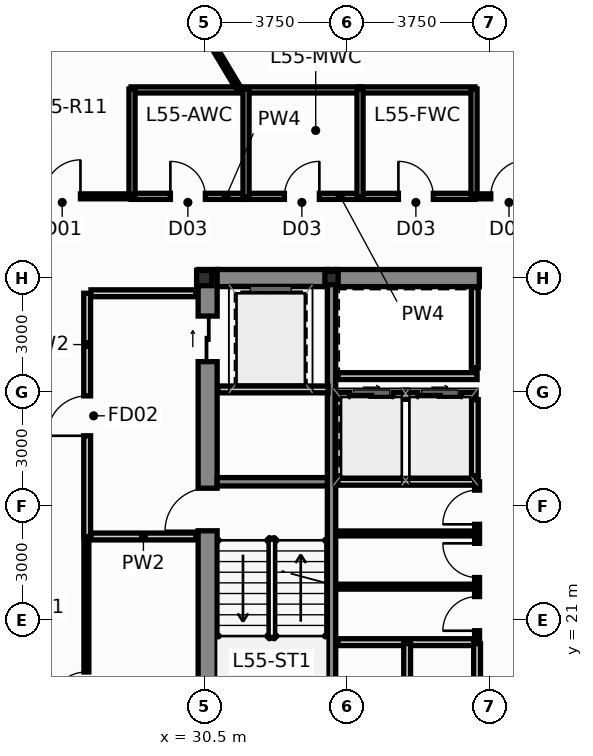
"""IFC4 building model, lengths in metres.
Left out: names, types, materials, properties, quantities, classifications, styles, units other than length and angle.
Written with IfcOpenShell. Run it as: python <this file> out.ifc"""

import sys

from ifc_helpers import new_model, si_unit, direction, frame, frame_2d, origin, origin_2d, place, context, subcontext, project, spatial, rectangle, hollow_rectangle, i_section, extrude, source, transform, mapped, element, fill, save


model = new_model("IFC4")
c1 = context("Model", 3, precision=1e-05, world=origin(), true_north=direction((0.0, 1.0)))
c2 = subcontext(c1, "Body", "Model", "MODEL_VIEW")
j1 = project(units=[si_unit("LENGTHUNIT", "METRE"), si_unit("PLANEANGLEUNIT", "RADIAN")], contexts=[c1])
p1 = place(None, origin())
s1 = spatial("IfcSite", under=j1, at=p1, CompositionType="ELEMENT")
p2 = place(p1, origin())
s2 = spatial("IfcBuilding", under=s1, at=p2, CompositionType="ELEMENT")
p3 = place(p2, frame((0.0, 0.0, 209.6)))
s3 = spatial("IfcBuildingStorey", under=s2, at=p3, CompositionType="ELEMENT", Elevation=209.6)
m1 = source(origin(), c2, "Body", "SweptSolid", [
    extrude(i_section(OverallWidth=0.4, OverallDepth=0.4, WebThickness=0.02, FlangeThickness=0.032, at=origin_2d()), origin(), (0.0, 0.0, 1.0), 3.65),
])
p4 = place(p3, frame((30.5, 30.0, 0.0), z_axis=(0.0, 0.0, 1.0), x_axis=(1.0, 0.0, 0.0)))
e1 = element("IfcColumn", 1, at=p4, inside=s3, PredefinedType="COLUMN", context=c2, shape_type="MappedRepresentation", body=[
    mapped(m1, transform((0.0, 0.0, 0.0), scale=1.0)),
])
m2 = source(origin(), c2, "Body", "SweptSolid", [
    extrude(hollow_rectangle(XDim=0.35, YDim=0.35, WallThickness=0.016, at=origin_2d()), origin(), (0.0, 0.0, 1.0), 3.65),
])
p5 = place(p3, frame((33.85, 30.0, 0.0), z_axis=(0.0, 0.0, 1.0), x_axis=(1.0, 0.0, 0.0)))
e2 = element("IfcColumn", 2, at=p5, inside=s3, PredefinedType="COLUMN", context=c2, shape_type="MappedRepresentation", body=[
    mapped(m2, transform((0.0, 0.0, 0.0), scale=1.0)),
])
p6 = place(p3, frame((30.59, 16.95, 0.0), z_axis=(0.0, 0.0, 1.0), x_axis=(0.0, 1.0, 0.0)))
e3 = element("IfcWall", 3, at=p6, inside=s3, PredefinedType="SHEAR", context=c2, shape_type="SweptSolid", body=[
    extrude(rectangle(XDim=13.275, YDim=0.5, at=frame_2d((6.638, 0.0))), origin(), (0.0, 0.0, 1.0), 3.65),
])
p7 = place(p6, frame((6.4, 0.0, 0.0)))
e4 = element("IfcOpeningElement", 4, at=p7, cuts=e3, PredefinedType="OPENING", context=c2, shape_type="SweptSolid", body=[
    extrude(rectangle(XDim=1.12, YDim=2.15, at=frame_2d((0.56, 1.075))), frame((0.0, 0.262, 0.0), z_axis=(0.0, -1.0, 0.0), x_axis=(1.0, 0.0, 0.0)), (0.0, 0.0, 1.0), 0.524),
])
p8 = place(p6, frame((10.85, 0.0, 0.0)))
e5 = element("IfcOpeningElement", 5, at=p8, cuts=e3, PredefinedType="OPENING", context=c2, shape_type="SweptSolid", body=[
    extrude(rectangle(XDim=1.2, YDim=2.2, at=frame_2d((0.6, 1.1))), frame((0.0, 0.262, 0.0), z_axis=(0.0, -1.0, 0.0), x_axis=(1.0, 0.0, 0.0)), (0.0, 0.0, 1.0), 0.524),
])
p9 = place(p3, frame((30.84, 30.0, 0.0), z_axis=(0.0, 0.0, 1.0), x_axis=(1.0, 0.0, 0.0)))
e6 = element("IfcWall", 6, at=p9, inside=s3, PredefinedType="SHEAR", context=c2, shape_type="SweptSolid", body=[
    extrude(rectangle(XDim=2.9, YDim=0.45, at=frame_2d((1.45, 0.0))), origin(), (0.0, 0.0, 1.0), 3.65),
])
p10 = place(p3, frame((33.96, 30.0, 0.0), z_axis=(0.0, 0.0, 1.0), x_axis=(1.0, 0.0, 0.0)))
e7 = element("IfcWall", 7, at=p10, inside=s3, PredefinedType="SHEAR", context=c2, shape_type="SweptSolid", body=[
    extrude(rectangle(XDim=3.78, YDim=0.45, at=frame_2d((1.89, 0.0))), origin(), (0.0, 0.0, 1.0), 3.65),
])
p11 = place(p3, frame((33.85, 16.95, 0.0), z_axis=(0.0, 0.0, 1.0), x_axis=(0.0, 1.0, 0.0)))
e8 = element("IfcWall", 8, at=p11, inside=s3, PredefinedType="SHEAR", context=c2, shape_type="SweptSolid", body=[
    extrude(rectangle(XDim=13.275, YDim=0.22, at=frame_2d((6.638, 0.0))), origin(), (0.0, 0.0, 1.0), 3.65),
])
p12 = place(p3, frame((30.84, 24.64, 0.0), z_axis=(0.0, 0.0, 1.0), x_axis=(1.0, 0.0, 0.0)))
e9 = element("IfcWall", 9, at=p12, inside=s3, PredefinedType="SHEAR", context=c2, shape_type="SweptSolid", body=[
    extrude(rectangle(XDim=2.9, YDim=0.22, at=frame_2d((1.45, 0.0))), origin(), (0.0, 0.0, 1.0), 3.65),
])
p13 = place(p3, frame((34.02, 26.9, 0.0), z_axis=(0.0, 0.0, 1.0), x_axis=(1.0, 0.0, 0.0)))
e10 = element("IfcWall", 10, at=p13, inside=s3, PredefinedType="PARTITIONING", context=c2, shape_type="SweptSolid", body=[
    extrude(rectangle(XDim=3.6, YDim=0.18, at=frame_2d((1.8, 0.0))), origin(), (0.0, 0.0, 1.0), 3.4),
])
p14 = place(p13, frame((0.3, 0.0, 0.0)))
e11 = element("IfcOpeningElement", 11, at=p14, cuts=e10, PredefinedType="OPENING", context=c2, shape_type="SweptSolid", body=[
    extrude(rectangle(XDim=1.15, YDim=2.2, at=frame_2d((0.575, 1.1))), frame((0.0, 0.102, 0.0), z_axis=(0.0, -1.0, 0.0), x_axis=(1.0, 0.0, 0.0)), (0.0, 0.0, 1.0), 0.204),
])
p15 = place(p13, frame((2.1, 0.0, 0.0)))
e12 = element("IfcOpeningElement", 12, at=p15, cuts=e10, PredefinedType="OPENING", context=c2, shape_type="SweptSolid", body=[
    extrude(rectangle(XDim=1.15, YDim=2.2, at=frame_2d((0.575, 1.1))), frame((0.0, 0.102, 0.0), z_axis=(0.0, -1.0, 0.0), x_axis=(1.0, 0.0, 0.0)), (0.0, 0.0, 1.0), 0.204),
])
p16 = place(p3, frame((37.62, 24.8, 0.0), z_axis=(0.0, 0.0, 1.0), x_axis=(0.0, 1.0, 0.0)))
e13 = element("IfcWall", 13, at=p16, inside=s3, PredefinedType="PARTITIONING", context=c2, shape_type="SweptSolid", body=[
    extrude(rectangle(XDim=2.0, YDim=0.18, at=frame_2d((1.0, 0.0))), origin(), (0.0, 0.0, 1.0), 3.4),
])
p17 = place(p3, frame((34.02, 24.64, 0.0), z_axis=(0.0, 0.0, 1.0), x_axis=(1.0, 0.0, 0.0)))
e14 = element("IfcWall", 14, at=p17, inside=s3, PredefinedType="PARTITIONING", context=c2, shape_type="SweptSolid", body=[
    extrude(rectangle(XDim=3.68, YDim=0.18, at=frame_2d((1.84, 0.0))), origin(), (0.0, 0.0, 1.0), 3.4),
])
p18 = place(p3, frame((34.02, 27.42, 0.0), z_axis=(0.0, 0.0, 1.0), x_axis=(1.0, 0.0, 0.0)))
e15 = element("IfcWall", 15, at=p18, inside=s3, PredefinedType="PARTITIONING", context=c2, shape_type="SweptSolid", body=[
    extrude(rectangle(XDim=3.66, YDim=0.18, at=frame_2d((1.83, 0.0))), origin(), (0.0, 0.0, 1.0), 3.4),
])
p19 = place(p3, frame((37.62, 27.64, 0.0), z_axis=(0.0, 0.0, 1.0), x_axis=(0.0, 1.0, 0.0)))
e16 = element("IfcWall", 16, at=p19, inside=s3, PredefinedType="PARTITIONING", context=c2, shape_type="SweptSolid", body=[
    extrude(rectangle(XDim=2.11, YDim=0.18, at=frame_2d((1.055, 0.0))), origin(), (0.0, 0.0, 1.0), 3.4),
])
p20 = place(p3, frame((27.42, 23.2, 0.0), z_axis=(0.0, 0.0, 1.0), x_axis=(0.0, 1.0, 0.0)))
e17 = element("IfcWall", 17, at=p20, inside=s3, PredefinedType="PARTITIONING", context=c2, shape_type="SweptSolid", body=[
    extrude(rectangle(XDim=6.4, YDim=0.18, at=frame_2d((3.2, 0.0))), origin(), (0.0, 0.0, 1.0), 3.078),
])
p21 = place(p20, frame((2.65, 0.0, 0.0)))
e18 = element("IfcOpeningElement", 18, at=p21, cuts=e17, PredefinedType="OPENING", context=c2, shape_type="SweptSolid", body=[
    extrude(rectangle(XDim=1.05, YDim=2.15, at=frame_2d((0.525, 1.075))), frame((0.0, 0.102, 0.0), z_axis=(0.0, -1.0, 0.0), x_axis=(1.0, 0.0, 0.0)), (0.0, 0.0, 1.0), 0.204),
])
p22 = place(p3, frame((27.52, 23.2, 0.0), z_axis=(0.0, 0.0, 1.0), x_axis=(1.0, 0.0, 0.0)))
e19 = element("IfcWall", 19, at=p22, inside=s3, PredefinedType="PARTITIONING", context=c2, shape_type="SweptSolid", body=[
    extrude(rectangle(XDim=2.76, YDim=0.18, at=frame_2d((1.38, 0.0))), origin(), (0.0, 0.0, 1.0), 3.4),
])
p23 = place(p3, frame((27.52, 29.6, 0.0), z_axis=(0.0, 0.0, 1.0), x_axis=(1.0, 0.0, 0.0)))
e20 = element("IfcWall", 20, at=p23, inside=s3, PredefinedType="PARTITIONING", context=c2, shape_type="SweptSolid", body=[
    extrude(rectangle(XDim=2.76, YDim=0.18, at=frame_2d((1.38, 0.0))), origin(), (0.0, 0.0, 1.0), 2.925),
])
p24 = place(p3, frame((30.86, 27.07, 0.0), z_axis=(0.0, 0.0, 1.0), x_axis=(1.0, 0.0, 0.0)))
e21 = element("IfcWall", 21, at=p24, inside=s3, PredefinedType="PARTITIONING", context=c2, shape_type="SweptSolid", body=[
    extrude(rectangle(XDim=2.9, YDim=0.18, at=frame_2d((1.45, 0.0))), origin(), (0.0, 0.0, 1.0), 3.4),
])
p25 = place(p3, frame((34.02, 20.42, 0.0), z_axis=(0.0, 0.0, 1.0), x_axis=(1.0, 0.0, 0.0)))
e22 = element("IfcWall", 22, at=p25, inside=s3, PredefinedType="PARTITIONING", context=c2, shape_type="SweptSolid", body=[
    extrude(rectangle(XDim=3.64, YDim=0.18, at=frame_2d((1.82, 0.0))), origin(), (0.0, 0.0, 1.0), 3.4),
])
for number, where, z_axis, x_axis in (
    (23, (34.02, 21.88, 0.0), (0.0, 0.0, 1.0), (1.0, 0.0, 0.0)),
    (24, (34.02, 23.28, 0.0), (0.0, 0.0, 1.0), (1.0, 0.0, 0.0)),
):
    element("IfcWall", number, at=place(p3, frame(where, z_axis=z_axis, x_axis=x_axis)), inside=s3, PredefinedType="PARTITIONING", context=c2, shape_type="SweptSolid", body=[
        extrude(rectangle(XDim=3.58, YDim=0.13, at=frame_2d((1.79, 0.0))), origin(), (0.0, 0.0, 1.0), 3.4),
    ])
p26 = place(p3, frame((37.68, 20.5, 0.0), z_axis=(0.0, 0.0, 1.0), x_axis=(0.0, 1.0, 0.0)))
e25 = element("IfcWall", 25, at=p26, inside=s3, PredefinedType="PARTITIONING", context=c2, shape_type="SweptSolid", body=[
    extrude(rectangle(XDim=4.14, YDim=0.13, at=frame_2d((2.07, 0.0))), origin(), (0.0, 0.0, 1.0), 3.4),
])
p27 = place(p26, frame((0.22, 0.0, 0.0)))
e26 = element("IfcOpeningElement", 26, at=p27, cuts=e25, PredefinedType="OPENING", context=c2, shape_type="SweptSolid", body=[
    extrude(rectangle(XDim=0.9, YDim=2.1, at=frame_2d((0.45, 1.05))), frame((0.0, 0.077, 0.0), z_axis=(0.0, -1.0, 0.0), x_axis=(1.0, 0.0, 0.0)), (0.0, 0.0, 1.0), 0.154),
])
p28 = place(p26, frame((1.62, 0.0, 0.0)))
e27 = element("IfcOpeningElement", 27, at=p28, cuts=e25, PredefinedType="OPENING", context=c2, shape_type="SweptSolid", body=[
    extrude(rectangle(XDim=0.9, YDim=2.1, at=frame_2d((0.45, 1.05))), frame((0.0, 0.077, 0.0), z_axis=(0.0, -1.0, 0.0), x_axis=(1.0, 0.0, 0.0)), (0.0, 0.0, 1.0), 0.154),
])
p29 = place(p26, frame((3.02, 0.0, 0.0)))
e28 = element("IfcOpeningElement", 28, at=p29, cuts=e25, PredefinedType="OPENING", context=c2, shape_type="SweptSolid", body=[
    extrude(rectangle(XDim=0.9, YDim=2.1, at=frame_2d((0.45, 1.05))), frame((0.0, 0.077, 0.0), z_axis=(0.0, -1.0, 0.0), x_axis=(1.0, 0.0, 0.0)), (0.0, 0.0, 1.0), 0.154),
])
p30 = place(p3, frame((35.84, 17.68, 0.0), z_axis=(0.0, 0.0, 1.0), x_axis=(0.0, 1.0, 0.0)))
e29 = element("IfcWall", 29, at=p30, inside=s3, PredefinedType="PARTITIONING", context=c2, shape_type="SweptSolid", body=[
    extrude(rectangle(XDim=2.7, YDim=0.18, at=frame_2d((1.35, 0.0))), origin(), (0.0, 0.0, 1.0), 3.4),
])
p31 = place(p30, frame((0.85, 0.0, 0.0)))
e30 = element("IfcOpeningElement", 30, at=p31, cuts=e29, PredefinedType="OPENING", context=c2, shape_type="SweptSolid", body=[
    extrude(rectangle(XDim=0.9, YDim=2.1, at=frame_2d((0.45, 1.05))), frame((0.0, 0.102, 0.0), z_axis=(0.0, -1.0, 0.0), x_axis=(1.0, 0.0, 0.0)), (0.0, 0.0, 1.0), 0.204),
])
p32 = place(p3, frame((37.68, 17.68, 0.0), z_axis=(0.0, 0.0, 1.0), x_axis=(0.0, 1.0, 0.0)))
e31 = element("IfcWall", 31, at=p32, inside=s3, PredefinedType="PARTITIONING", context=c2, shape_type="SweptSolid", body=[
    extrude(rectangle(XDim=2.7, YDim=0.18, at=frame_2d((1.35, 0.0))), origin(), (0.0, 0.0, 1.0), 3.4),
])
p33 = place(p32, frame((0.85, 0.0, 0.0)))
e32 = element("IfcOpeningElement", 32, at=p33, cuts=e31, PredefinedType="OPENING", context=c2, shape_type="SweptSolid", body=[
    extrude(rectangle(XDim=0.9, YDim=2.1, at=frame_2d((0.45, 1.05))), frame((0.0, 0.102, 0.0), z_axis=(0.0, -1.0, 0.0), x_axis=(1.0, 0.0, 0.0)), (0.0, 0.0, 1.0), 0.204),
])
p34 = place(p3, frame((28.575, 32.15, 0.0), z_axis=(0.0, 0.0, 1.0), x_axis=(1.0, 0.0, 0.0)))
e33 = element("IfcWall", 33, at=p34, inside=s3, PredefinedType="PLUMBINGWALL", context=c2, shape_type="SweptSolid", body=[
    extrude(rectangle(XDim=3.05, YDim=0.16, at=frame_2d((1.525, 0.0))), origin(), (0.0, 0.0, 1.0), 3.078),
])
p35 = place(p34, frame((1.035, 0.0, 0.0)))
e34 = element("IfcOpeningElement", 34, at=p35, cuts=e33, PredefinedType="OPENING", context=c2, shape_type="SweptSolid", body=[
    extrude(rectangle(XDim=0.92, YDim=2.1, at=frame_2d((0.46, 1.05))), frame((0.0, 0.092, 0.0), z_axis=(0.0, -1.0, 0.0), x_axis=(1.0, 0.0, 0.0)), (0.0, 0.0, 1.0), 0.184),
])
p36 = place(p3, frame((31.575, 32.15, 0.0), z_axis=(0.0, 0.0, 1.0), x_axis=(1.0, 0.0, 0.0)))
e35 = element("IfcWall", 35, at=p36, inside=s3, PredefinedType="PLUMBINGWALL", context=c2, shape_type="SweptSolid", body=[
    extrude(rectangle(XDim=3.05, YDim=0.16, at=frame_2d((1.525, 0.0))), origin(), (0.0, 0.0, 1.0), 3.078),
])
p37 = place(p36, frame((1.035, 0.0, 0.0)))
e36 = element("IfcOpeningElement", 36, at=p37, cuts=e35, PredefinedType="OPENING", context=c2, shape_type="SweptSolid", body=[
    extrude(rectangle(XDim=0.92, YDim=2.1, at=frame_2d((0.46, 1.05))), frame((0.0, 0.092, 0.0), z_axis=(0.0, -1.0, 0.0), x_axis=(1.0, 0.0, 0.0)), (0.0, 0.0, 1.0), 0.184),
])
p38 = place(p3, frame((34.575, 32.15, 0.0), z_axis=(0.0, 0.0, 1.0), x_axis=(1.0, 0.0, 0.0)))
e37 = element("IfcWall", 37, at=p38, inside=s3, PredefinedType="PLUMBINGWALL", context=c2, shape_type="SweptSolid", body=[
    extrude(rectangle(XDim=3.05, YDim=0.16, at=frame_2d((1.525, 0.0))), origin(), (0.0, 0.0, 1.0), 3.078),
])
p39 = place(p38, frame((1.035, 0.0, 0.0)))
e38 = element("IfcOpeningElement", 38, at=p39, cuts=e37, PredefinedType="OPENING", context=c2, shape_type="SweptSolid", body=[
    extrude(rectangle(XDim=0.92, YDim=2.1, at=frame_2d((0.46, 1.05))), frame((0.0, 0.092, 0.0), z_axis=(0.0, -1.0, 0.0), x_axis=(1.0, 0.0, 0.0)), (0.0, 0.0, 1.0), 0.184),
])
for number, where, z_axis, x_axis in (
    (39, (31.575, 34.95, 0.0), (0.0, 0.0, 1.0), (1.0, 0.0, 0.0)),
    (40, (37.625, 34.95, 0.0), (0.0, 0.0, 1.0), (-1.0, 0.0, 0.0)),
):
    element("IfcWall", number, at=place(p3, frame(where, z_axis=z_axis, x_axis=x_axis)), inside=s3, PredefinedType="PLUMBINGWALL", context=c2, shape_type="SweptSolid", body=[
        extrude(rectangle(XDim=3.05, YDim=0.16, at=frame_2d((1.525, 0.0))), origin(), (0.0, 0.0, 1.0), 3.078),
    ])
p40 = place(p3, frame((28.575, 34.95, 0.0), z_axis=(0.0, 0.0, 1.0), x_axis=(1.0, 0.0, 0.0)))
e41 = element("IfcWall", 41, at=p40, inside=s3, PredefinedType="PLUMBINGWALL", context=c2, shape_type="SweptSolid", body=[
    extrude(rectangle(XDim=2.88, YDim=0.16, at=frame_2d((1.44, 0.0))), origin(), (0.0, 0.0, 1.0), 3.078),
])
p41 = place(p3, frame((31.6, 32.125, 0.0), z_axis=(0.0, 0.0, 1.0), x_axis=(0.0, 1.0, 0.0)))
e42 = element("IfcWall", 42, at=p41, inside=s3, PredefinedType="PLUMBINGWALL", context=c2, shape_type="SweptSolid", body=[
    extrude(rectangle(XDim=2.85, YDim=0.16, at=frame_2d((1.425, 0.0))), origin(), (0.0, 0.0, 1.0), 2.925),
])
for number, where, z_axis, x_axis in (
    (43, (28.6, 32.125, 0.0), (0.0, 0.0, 1.0), (0.0, 1.0, 0.0)),
    (44, (34.6, 32.125, 0.0), (0.0, 0.0, 1.0), (0.0, 1.0, 0.0)),
    (45, (37.6, 32.125, 0.0), (0.0, 0.0, 1.0), (0.0, 1.0, 0.0)),
):
    element("IfcWall", number, at=place(p3, frame(where, z_axis=z_axis, x_axis=x_axis)), inside=s3, PredefinedType="PLUMBINGWALL", context=c2, shape_type="SweptSolid", body=[
        extrude(rectangle(XDim=2.85, YDim=0.16, at=frame_2d((1.425, 0.0))), origin(), (0.0, 0.0, 1.0), 3.4),
    ])
p42 = place(p3, frame((27.4, 15.205, 0.0), z_axis=(0.0, 0.0, 1.0), x_axis=(0.0, 1.0, 0.0)))
e46 = element("IfcWall", 46, at=p42, inside=s3, PredefinedType="PARTITIONING", context=c2, shape_type="SweptSolid", body=[
    extrude(rectangle(XDim=7.9, YDim=0.13, at=frame_2d((3.95, 0.0))), origin(), (0.0, 0.0, 1.0), 3.078),
])
p43 = place(p42, frame((3.47, 0.0, 0.0)))
e47 = element("IfcOpeningElement", 47, at=p43, cuts=e46, PredefinedType="OPENING", context=c2, shape_type="SweptSolid", body=[
    extrude(rectangle(XDim=0.96, YDim=2.15, at=frame_2d((0.48, 1.075))), frame((0.0, 0.077, 0.0), z_axis=(0.0, -1.0, 0.0), x_axis=(1.0, 0.0, 0.0)), (0.0, 0.0, 1.0), 0.154),
])
p44 = place(p3, frame((28.147, 40.424, 0.0), z_axis=(0.0, 0.0, 1.0), x_axis=(0.514214257659, -0.857661761547, 0.0)))
e48 = element("IfcWall", 48, at=p44, inside=s3, PredefinedType="PARTITIONING", context=c2, shape_type="SweptSolid", body=[
    extrude(rectangle(XDim=6.378, YDim=0.13, at=frame_2d((3.189, 0.0))), origin(), (0.0, 0.0, 1.0), 3.4),
])
p45 = place(p3, frame((23.583, 32.15, 0.0), z_axis=(0.0, 0.0, 1.0), x_axis=(1.0, 0.0, 0.0)))
e49 = element("IfcWall", 49, at=p45, inside=s3, PredefinedType="PARTITIONING", context=c2, shape_type="SweptSolid", body=[
    extrude(rectangle(XDim=5.012, YDim=0.13, at=frame_2d((2.506, 0.0))), origin(), (0.0, 0.0, 1.0), 3.4),
])
p46 = place(p45, frame((2.7, 0.0, 0.0)))
e50 = element("IfcOpeningElement", 50, at=p46, cuts=e49, PredefinedType="OPENING", context=c2, shape_type="SweptSolid", body=[
    extrude(rectangle(XDim=0.96, YDim=2.15, at=frame_2d((0.48, 1.075))), frame((0.0, 0.077, 0.0), z_axis=(0.0, -1.0, 0.0), x_axis=(1.0, 0.0, 0.0)), (0.0, 0.0, 1.0), 0.154),
])
p47 = place(p3, frame((37.605, 32.15, 0.0), z_axis=(0.0, 0.0, 1.0), x_axis=(1.0, 0.0, 0.0)))
e51 = element("IfcWall", 51, at=p47, inside=s3, PredefinedType="PARTITIONING", context=c2, shape_type="SweptSolid", body=[
    extrude(rectangle(XDim=1.83, YDim=0.13, at=frame_2d((0.915, 0.0))), origin(), (0.0, 0.0, 1.0), 3.078),
])
p48 = place(p47, frame((0.435, 0.0, 0.0)))
e52 = element("IfcOpeningElement", 52, at=p48, cuts=e51, PredefinedType="OPENING", context=c2, shape_type="SweptSolid", body=[
    extrude(rectangle(XDim=0.96, YDim=2.15, at=frame_2d((0.48, 1.075))), frame((0.0, 0.077, 0.0), z_axis=(0.0, -1.0, 0.0), x_axis=(1.0, 0.0, 0.0)), (0.0, 0.0, 1.0), 0.154),
])
p49 = place(p7, origin())
e53 = element("IfcDoor", 53, at=p49, inside=s3, OperationType="SINGLE_SWING_LEFT", PredefinedType="DOOR", context=c2, shape_type="SweptSolid", body=[
    extrude(rectangle(XDim=1.12, YDim=2.15, at=frame_2d((0.56, 1.075))), frame((0.0, 0.025, 0.0), z_axis=(0.0, -1.0, 0.0), x_axis=(1.0, 0.0, 0.0)), (0.0, 0.0, 1.0), 0.05),
])
fill(e4, e53)
p50 = place(p8, origin())
e54 = element("IfcDoor", 54, at=p50, inside=s3, OperationType="SLIDING_TO_LEFT", PredefinedType="DOOR", context=c2, shape_type="SweptSolid", body=[
    extrude(rectangle(XDim=1.2, YDim=2.2, at=frame_2d((0.6, 1.1))), frame((0.0, 0.025, 0.0), z_axis=(0.0, -1.0, 0.0), x_axis=(1.0, 0.0, 0.0)), (0.0, 0.0, 1.0), 0.05),
])
fill(e5, e54)
p51 = place(p14, origin())
e55 = element("IfcDoor", 55, at=p51, inside=s3, OperationType="SLIDING_TO_LEFT", PredefinedType="DOOR", context=c2, shape_type="SweptSolid", body=[
    extrude(rectangle(XDim=1.15, YDim=2.2, at=frame_2d((0.575, 1.1))), frame((0.0, 0.025, 0.0), z_axis=(0.0, -1.0, 0.0), x_axis=(1.0, 0.0, 0.0)), (0.0, 0.0, 1.0), 0.05),
])
fill(e11, e55)
p52 = place(p15, origin())
e56 = element("IfcDoor", 56, at=p52, inside=s3, OperationType="SLIDING_TO_RIGHT", PredefinedType="DOOR", context=c2, shape_type="SweptSolid", body=[
    extrude(rectangle(XDim=1.15, YDim=2.2, at=frame_2d((0.575, 1.1))), frame((0.0, 0.025, 0.0), z_axis=(0.0, -1.0, 0.0), x_axis=(1.0, 0.0, 0.0)), (0.0, 0.0, 1.0), 0.05),
])
fill(e12, e56)
p53 = place(p21, origin())
e57 = element("IfcDoor", 57, at=p53, inside=s3, OperationType="SINGLE_SWING_LEFT", PredefinedType="DOOR", context=c2, shape_type="SweptSolid", body=[
    extrude(rectangle(XDim=1.05, YDim=2.15, at=frame_2d((0.525, 1.075))), frame((0.0, 0.025, 0.0), z_axis=(0.0, -1.0, 0.0), x_axis=(1.0, 0.0, 0.0)), (0.0, 0.0, 1.0), 0.05),
])
fill(e18, e57)
p54 = place(p27, origin())
e58 = element("IfcDoor", 58, at=p54, inside=s3, OperationType="SINGLE_SWING_LEFT", PredefinedType="DOOR", context=c2, shape_type="SweptSolid", body=[
    extrude(rectangle(XDim=0.9, YDim=2.1, at=frame_2d((0.45, 1.05))), frame((0.0, 0.025, 0.0), z_axis=(0.0, -1.0, 0.0), x_axis=(1.0, 0.0, 0.0)), (0.0, 0.0, 1.0), 0.05),
])
fill(e26, e58)
p55 = place(p28, origin())
e59 = element("IfcDoor", 59, at=p55, inside=s3, OperationType="SINGLE_SWING_RIGHT", PredefinedType="DOOR", context=c2, shape_type="SweptSolid", body=[
    extrude(rectangle(XDim=0.9, YDim=2.1, at=frame_2d((0.45, 1.05))), frame((0.0, 0.025, 0.0), z_axis=(0.0, -1.0, 0.0), x_axis=(1.0, 0.0, 0.0)), (0.0, 0.0, 1.0), 0.05),
])
fill(e27, e59)
p56 = place(p29, origin())
e60 = element("IfcDoor", 60, at=p56, inside=s3, OperationType="SINGLE_SWING_LEFT", PredefinedType="DOOR", context=c2, shape_type="SweptSolid", body=[
    extrude(rectangle(XDim=0.9, YDim=2.1, at=frame_2d((0.45, 1.05))), frame((0.0, 0.025, 0.0), z_axis=(0.0, -1.0, 0.0), x_axis=(1.0, 0.0, 0.0)), (0.0, 0.0, 1.0), 0.05),
])
fill(e28, e60)
p57 = place(p35, origin())
e61 = element("IfcDoor", 61, at=p57, inside=s3, OperationType="SINGLE_SWING_LEFT", PredefinedType="DOOR", context=c2, shape_type="SweptSolid", body=[
    extrude(rectangle(XDim=0.92, YDim=2.1, at=frame_2d((0.46, 1.05))), frame((0.0, 0.025, 0.0), z_axis=(0.0, -1.0, 0.0), x_axis=(1.0, 0.0, 0.0)), (0.0, 0.0, 1.0), 0.05),
])
fill(e34, e61)
p58 = place(p37, origin())
e62 = element("IfcDoor", 62, at=p58, inside=s3, OperationType="SINGLE_SWING_RIGHT", PredefinedType="DOOR", context=c2, shape_type="SweptSolid", body=[
    extrude(rectangle(XDim=0.92, YDim=2.1, at=frame_2d((0.46, 1.05))), frame((0.0, 0.025, 0.0), z_axis=(0.0, -1.0, 0.0), x_axis=(1.0, 0.0, 0.0)), (0.0, 0.0, 1.0), 0.05),
])
fill(e36, e62)
p59 = place(p39, origin())
e63 = element("IfcDoor", 63, at=p59, inside=s3, OperationType="SINGLE_SWING_LEFT", PredefinedType="DOOR", context=c2, shape_type="SweptSolid", body=[
    extrude(rectangle(XDim=0.92, YDim=2.1, at=frame_2d((0.46, 1.05))), frame((0.0, 0.025, 0.0), z_axis=(0.0, -1.0, 0.0), x_axis=(1.0, 0.0, 0.0)), (0.0, 0.0, 1.0), 0.05),
])
fill(e38, e63)
p60 = place(p43, origin())
e64 = element("IfcDoor", 64, at=p60, inside=s3, OperationType="SINGLE_SWING_LEFT", PredefinedType="DOOR", context=c2, shape_type="SweptSolid", body=[
    extrude(rectangle(XDim=0.96, YDim=2.15, at=frame_2d((0.48, 1.075))), frame((0.0, 0.025, 0.0), z_axis=(0.0, -1.0, 0.0), x_axis=(1.0, 0.0, 0.0)), (0.0, 0.0, 1.0), 0.05),
])
fill(e47, e64)
p61 = place(p46, origin())
e65 = element("IfcDoor", 65, at=p61, inside=s3, OperationType="SINGLE_SWING_RIGHT", PredefinedType="DOOR", context=c2, shape_type="SweptSolid", body=[
    extrude(rectangle(XDim=0.96, YDim=2.15, at=frame_2d((0.48, 1.075))), frame((0.0, 0.025, 0.0), z_axis=(0.0, -1.0, 0.0), x_axis=(1.0, 0.0, 0.0)), (0.0, 0.0, 1.0), 0.05),
])
fill(e50, e65)
p62 = place(p48, origin())
e66 = element("IfcDoor", 66, at=p62, inside=s3, OperationType="SINGLE_SWING_RIGHT", PredefinedType="DOOR", context=c2, shape_type="SweptSolid", body=[
    extrude(rectangle(XDim=0.96, YDim=2.15, at=frame_2d((0.48, 1.075))), frame((0.0, 0.025, 0.0), z_axis=(0.0, -1.0, 0.0), x_axis=(1.0, 0.0, 0.0)), (0.0, 0.0, 1.0), 0.05),
])
fill(e52, e66)
save(model, sys.argv[1])
